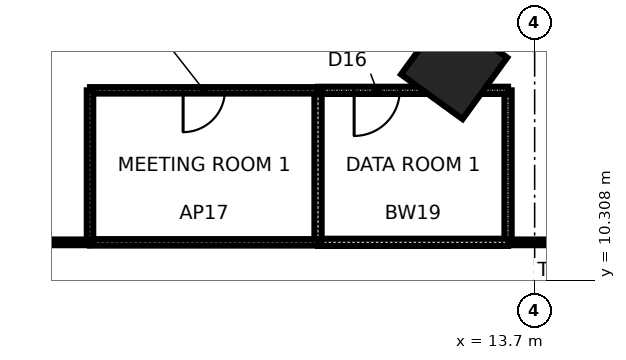
"""IFC4 building model, lengths in metres.
Left out: names, types, materials, properties, quantities, classifications, styles, units other than length and angle.
Written with IfcOpenShell. Run it as: python <this file> out.ifc"""

import sys

from ifc_helpers import new_model, si_unit, direction, frame, frame_2d, origin, origin_2d, place, context, subcontext, project, spatial, rectangle, extrude, element, fill, save


model = new_model("IFC4")
c1 = context("Model", 3, precision=1e-05, world=origin(), true_north=direction((0.0, 1.0)))
c2 = subcontext(c1, "Body", "Model", "MODEL_VIEW")
j1 = project(units=[si_unit("LENGTHUNIT", "METRE"), si_unit("PLANEANGLEUNIT", "RADIAN")], contexts=[c1])
p1 = place(None, origin())
s1 = spatial("IfcSite", under=j1, at=p1, CompositionType="ELEMENT")
p2 = place(p1, origin())
s2 = spatial("IfcBuilding", under=s1, at=p2, CompositionType="ELEMENT")
p3 = place(p2, frame((0.0, 0.0, 32.2)))
s3 = spatial("IfcBuildingStorey", under=s2, at=p3, CompositionType="ELEMENT", Elevation=32.2)
p4 = place(p3, frame((11.581, 15.94, 0.0), z_axis=(0.0, 0.0, 1.0), x_axis=(0.587785252292, 0.809016994375, 0.0)))
e1 = element("IfcColumn", 1, at=p4, inside=s3, PredefinedType="COLUMN", context=c2, shape_type="SweptSolid", body=[
    extrude(rectangle(XDim=2.0, YDim=2.0, at=origin_2d()), origin(), (0.0, 0.0, 1.0), 4.2),
])
p5 = place(p3, frame((16.0, 11.3, 0.0), z_axis=(0.0, 0.0, 1.0), x_axis=(-1.0, 0.0, 0.0)))
e2 = element("IfcWall", 2, at=p5, inside=s3, PredefinedType="PARTITIONING", context=c2, shape_type="SweptSolid", body=[
    extrude(rectangle(XDim=3.0, YDim=0.15, at=frame_2d((1.5, 0.0))), origin(), (0.0, 0.0, 1.0), 4.04),
])
p6 = place(p3, frame((13.0, 11.3, 0.0), z_axis=(0.0, 0.0, 1.0), x_axis=(0.0, 1.0, 0.0)))
e3 = element("IfcWall", 3, at=p6, inside=s3, PredefinedType="SOLIDWALL", context=c2, shape_type="SweptSolid", body=[
    extrude(rectangle(XDim=4.0, YDim=0.19, at=frame_2d((2.0, 0.0))), origin(), (0.0, 0.0, 1.0), 4.04),
])
p7 = place(p3, frame((8.0, 11.3, 0.0), z_axis=(0.0, 0.0, 1.0), x_axis=(1.0, 0.0, 0.0)))
e4 = element("IfcWall", 4, at=p7, inside=s3, PredefinedType="SOLIDWALL", context=c2, shape_type="SweptSolid", body=[
    extrude(rectangle(XDim=5.0, YDim=0.19, at=frame_2d((2.5, 0.0))), origin(), (0.0, 0.0, 1.0), 4.04),
])
p8 = place(p3, frame((13.0, 15.3, 0.0), z_axis=(0.0, 0.0, 1.0), x_axis=(-1.0, 0.0, 0.0)))
e5 = element("IfcWall", 5, at=p8, inside=s3, PredefinedType="SOLIDWALL", context=c2, shape_type="SweptSolid", body=[
    extrude(rectangle(XDim=5.0, YDim=0.19, at=frame_2d((2.5, 0.0))), origin(), (0.0, 0.0, 1.0), 4.04),
])
p9 = place(p8, frame((2.85, 0.0, 0.0)))
e6 = element("IfcOpeningElement", 6, at=p9, cuts=e5, PredefinedType="OPENING", context=c2, shape_type="SweptSolid", body=[
    extrude(rectangle(XDim=1.2, YDim=2.1, at=frame_2d((0.6, 1.05))), frame((0.0, 0.105, 0.0), z_axis=(0.0, -1.0, 0.0), x_axis=(1.0, 0.0, 0.0)), (0.0, 0.0, 1.0), 0.21),
])
p10 = place(p3, frame((8.0, 15.3, 0.0), z_axis=(0.0, 0.0, 1.0), x_axis=(0.0, -1.0, 0.0)))
e7 = element("IfcWall", 7, at=p10, inside=s3, PredefinedType="SOLIDWALL", context=c2, shape_type="SweptSolid", body=[
    extrude(rectangle(XDim=4.0, YDim=0.19, at=frame_2d((2.0, 0.0))), origin(), (0.0, 0.0, 1.0), 4.04),
])
p11 = place(p3, frame((2.0, 11.3, 0.0), z_axis=(0.0, 0.0, 1.0), x_axis=(1.0, 0.0, 0.0)))
e8 = element("IfcWall", 8, at=p11, inside=s3, PredefinedType="PARTITIONING", context=c2, shape_type="SweptSolid", body=[
    extrude(rectangle(XDim=6.0, YDim=0.17, at=frame_2d((3.0, 0.0))), origin(), (0.0, 0.0, 1.0), 4.04),
])
p12 = place(p3, frame((8.0, 15.3, 0.0), z_axis=(0.0, 0.0, 1.0), x_axis=(-1.0, 0.0, 0.0)))
e9 = element("IfcWall", 9, at=p12, inside=s3, PredefinedType="PARTITIONING", context=c2, shape_type="SweptSolid", body=[
    extrude(rectangle(XDim=6.0, YDim=0.17, at=frame_2d((3.0, 0.0))), origin(), (0.0, 0.0, 1.0), 4.04),
])
p13 = place(p12, frame((2.45, 0.0, 0.0)))
e10 = element("IfcOpeningElement", 10, at=p13, cuts=e9, PredefinedType="OPENING", context=c2, shape_type="SweptSolid", body=[
    extrude(rectangle(XDim=1.1, YDim=2.4, at=frame_2d((0.55, 1.2))), frame((0.0, 0.095, 0.0), z_axis=(0.0, -1.0, 0.0), x_axis=(1.0, 0.0, 0.0)), (0.0, 0.0, 1.0), 0.19),
])
p14 = place(p3, frame((2.0, 15.3, 0.0), z_axis=(0.0, 0.0, 1.0), x_axis=(0.0, -1.0, 0.0)))
e11 = element("IfcWall", 11, at=p14, inside=s3, PredefinedType="PARTITIONING", context=c2, shape_type="SweptSolid", body=[
    extrude(rectangle(XDim=4.0, YDim=0.17, at=frame_2d((2.0, 0.0))), origin(), (0.0, 0.0, 1.0), 4.04),
])
p15 = place(p3, frame((2.0, 11.3, 0.0), z_axis=(0.0, 0.0, 1.0), x_axis=(-1.0, 0.0, 0.0)))
e12 = element("IfcWall", 12, at=p15, inside=s3, PredefinedType="PARTITIONING", context=c2, shape_type="SweptSolid", body=[
    extrude(rectangle(XDim=8.0, YDim=0.15, at=frame_2d((4.0, 0.0))), origin(), (0.0, 0.0, 1.0), 4.04),
])
p16 = place(p13, origin())
e13 = element("IfcDoor", 13, at=p16, inside=s3, OperationType="SINGLE_SWING_RIGHT", PredefinedType="DOOR", context=c2, shape_type="SweptSolid", body=[
    extrude(rectangle(XDim=1.1, YDim=2.4, at=frame_2d((0.55, 1.2))), frame((0.0, 0.025, 0.0), z_axis=(0.0, -1.0, 0.0), x_axis=(1.0, 0.0, 0.0)), (0.0, 0.0, 1.0), 0.05),
])
fill(e10, e13)
p17 = place(p9, origin())
e14 = element("IfcDoor", 14, at=p17, inside=s3, OperationType="SINGLE_SWING_RIGHT", PredefinedType="DOOR", context=c2, shape_type="SweptSolid", body=[
    extrude(rectangle(XDim=1.2, YDim=2.1, at=frame_2d((0.6, 1.05))), frame((0.0, 0.025, 0.0), z_axis=(0.0, -1.0, 0.0), x_axis=(1.0, 0.0, 0.0)), (0.0, 0.0, 1.0), 0.05),
])
fill(e6, e14)
save(model, sys.argv[1])
